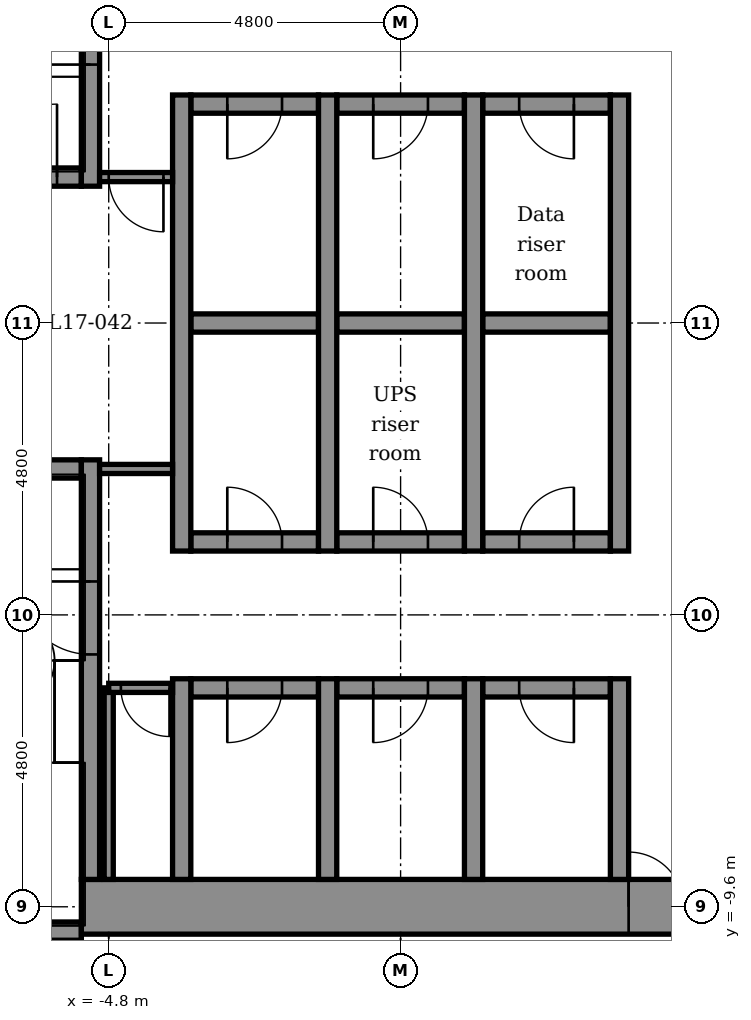
"""IFC4 building model, lengths in metres.
Left out: names, types, materials, properties, quantities, classifications, styles, units other than length and angle.
Written with IfcOpenShell. Run it as: python <this file> out.ifc"""

import sys

from ifc_helpers import new_model, si_unit, direction, frame, frame_2d, origin, place, context, subcontext, project, spatial, rectangle, extrude, element, fill, save


model = new_model("IFC4")
c1 = context("Model", 3, precision=1e-05, world=origin(), true_north=direction((0.0, 1.0)))
c2 = subcontext(c1, "Body", "Model", "MODEL_VIEW")
j1 = project(units=[si_unit("LENGTHUNIT", "METRE"), si_unit("PLANEANGLEUNIT", "RADIAN")], contexts=[c1])
p1 = place(None, origin())
s1 = spatial("IfcSite", under=j1, at=p1, CompositionType="ELEMENT")
p2 = place(p1, origin())
s2 = spatial("IfcBuilding", under=s1, at=p2, CompositionType="ELEMENT")
p3 = place(p2, frame((0.0, 0.0, 91.4)))
s3 = spatial("IfcBuildingStorey", under=s2, at=p3, CompositionType="ELEMENT", Elevation=91.4)
p4 = place(p3, frame((-9.15, -10.0, -0.2), z_axis=(0.0, 0.0, 1.0), x_axis=(1.0, 0.0, 0.0)))
e1 = element("IfcWall", 1, at=p4, inside=s3, PredefinedType="STANDARD", context=c2, shape_type="SweptSolid", body=[
    extrude(rectangle(XDim=3.9, YDim=0.3, at=frame_2d((1.95, 0.0))), origin(), (0.0, 0.0, 1.0), 4.5),
])
p5 = place(p3, frame((-5.25, -9.6, -0.2), z_axis=(0.0, 0.0, 1.0), x_axis=(1.0, 0.0, 0.0)))
e2 = element("IfcWall", 2, at=p5, inside=s3, PredefinedType="SHEAR", context=c2, shape_type="SweptSolid", body=[
    extrude(rectangle(XDim=10.2, YDim=0.9, at=frame_2d((5.1, 0.0))), origin(), (0.0, 0.0, 1.0), 4.5),
])
p6 = place(p5, frame((9.0, 0.0, 0.2)))
e3 = element("IfcOpeningElement", 3, at=p6, cuts=e2, PredefinedType="OPENING", context=c2, shape_type="SweptSolid", body=[
    extrude(rectangle(XDim=0.9, YDim=2.1, at=frame_2d((0.45, 1.05))), frame((0.0, 0.46, 0.0), z_axis=(0.0, -1.0, 0.0), x_axis=(1.0, 0.0, 0.0)), (0.0, 0.0, 1.0), 0.92),
])
p7 = place(p3, frame((-3.45, -6.0, -0.2), z_axis=(0.0, 0.0, 1.0), x_axis=(1.0, 0.0, 0.0)))
e4 = element("IfcWall", 4, at=p7, inside=s3, PredefinedType="STANDARD", context=c2, shape_type="SweptSolid", body=[
    extrude(rectangle(XDim=2.1, YDim=0.3, at=frame_2d((1.05, 0.0))), origin(), (0.0, 0.0, 1.0), 4.5),
])
p8 = place(p7, frame((0.6, 0.0, 0.2)))
e5 = element("IfcOpeningElement", 5, at=p8, cuts=e4, PredefinedType="OPENING", context=c2, shape_type="SweptSolid", body=[
    extrude(rectangle(XDim=0.9, YDim=2.1, at=frame_2d((0.45, 1.05))), frame((0.0, 0.16, 0.0), z_axis=(0.0, -1.0, 0.0), x_axis=(1.0, 0.0, 0.0)), (0.0, 0.0, 1.0), 0.32),
])
p9 = place(p3, frame((-1.05, -6.0, -0.2), z_axis=(0.0, 0.0, 1.0), x_axis=(1.0, 0.0, 0.0)))
e6 = element("IfcWall", 6, at=p9, inside=s3, PredefinedType="STANDARD", context=c2, shape_type="SweptSolid", body=[
    extrude(rectangle(XDim=2.1, YDim=0.3, at=frame_2d((1.05, 0.0))), origin(), (0.0, 0.0, 1.0), 4.5),
])
p10 = place(p9, frame((0.6, 0.0, 0.2)))
e7 = element("IfcOpeningElement", 7, at=p10, cuts=e6, PredefinedType="OPENING", context=c2, shape_type="SweptSolid", body=[
    extrude(rectangle(XDim=0.9, YDim=2.1, at=frame_2d((0.45, 1.05))), frame((0.0, 0.16, 0.0), z_axis=(0.0, -1.0, 0.0), x_axis=(1.0, 0.0, 0.0)), (0.0, 0.0, 1.0), 0.32),
])
p11 = place(p3, frame((1.35, -6.0, -0.2), z_axis=(0.0, 0.0, 1.0), x_axis=(1.0, 0.0, 0.0)))
e8 = element("IfcWall", 8, at=p11, inside=s3, PredefinedType="STANDARD", context=c2, shape_type="SweptSolid", body=[
    extrude(rectangle(XDim=2.1, YDim=0.3, at=frame_2d((1.05, 0.0))), origin(), (0.0, 0.0, 1.0), 4.5),
])
p12 = place(p11, frame((0.6, 0.0, 0.2)))
e9 = element("IfcOpeningElement", 9, at=p12, cuts=e8, PredefinedType="OPENING", context=c2, shape_type="SweptSolid", body=[
    extrude(rectangle(XDim=0.9, YDim=2.1, at=frame_2d((0.45, 1.05))), frame((0.0, 0.16, 0.0), z_axis=(0.0, -1.0, 0.0), x_axis=(1.0, 0.0, 0.0)), (0.0, 0.0, 1.0), 0.32),
])
p13 = place(p3, frame((-3.45, -3.6, -0.2), z_axis=(0.0, 0.0, 1.0), x_axis=(1.0, 0.0, 0.0)))
e10 = element("IfcWall", 10, at=p13, inside=s3, PredefinedType="STANDARD", context=c2, shape_type="SweptSolid", body=[
    extrude(rectangle(XDim=2.1, YDim=0.3, at=frame_2d((1.05, 0.0))), origin(), (0.0, 0.0, 1.0), 4.5),
])
p14 = place(p13, frame((0.6, 0.0, 0.2)))
e11 = element("IfcOpeningElement", 11, at=p14, cuts=e10, PredefinedType="OPENING", context=c2, shape_type="SweptSolid", body=[
    extrude(rectangle(XDim=0.9, YDim=2.1, at=frame_2d((0.45, 1.05))), frame((0.0, 0.16, 0.0), z_axis=(0.0, -1.0, 0.0), x_axis=(1.0, 0.0, 0.0)), (0.0, 0.0, 1.0), 0.32),
])
p15 = place(p3, frame((-1.05, -3.6, -0.2), z_axis=(0.0, 0.0, 1.0), x_axis=(1.0, 0.0, 0.0)))
e12 = element("IfcWall", 12, at=p15, inside=s3, PredefinedType="STANDARD", context=c2, shape_type="SweptSolid", body=[
    extrude(rectangle(XDim=2.1, YDim=0.3, at=frame_2d((1.05, 0.0))), origin(), (0.0, 0.0, 1.0), 4.5),
])
p16 = place(p15, frame((0.6, 0.0, 0.2)))
e13 = element("IfcOpeningElement", 13, at=p16, cuts=e12, PredefinedType="OPENING", context=c2, shape_type="SweptSolid", body=[
    extrude(rectangle(XDim=0.9, YDim=2.1, at=frame_2d((0.45, 1.05))), frame((0.0, 0.16, 0.0), z_axis=(0.0, -1.0, 0.0), x_axis=(1.0, 0.0, 0.0)), (0.0, 0.0, 1.0), 0.32),
])
p17 = place(p3, frame((1.35, -3.6, -0.2), z_axis=(0.0, 0.0, 1.0), x_axis=(1.0, 0.0, 0.0)))
e14 = element("IfcWall", 14, at=p17, inside=s3, PredefinedType="STANDARD", context=c2, shape_type="SweptSolid", body=[
    extrude(rectangle(XDim=2.1, YDim=0.3, at=frame_2d((1.05, 0.0))), origin(), (0.0, 0.0, 1.0), 4.5),
])
p18 = place(p17, frame((0.6, 0.0, 0.2)))
e15 = element("IfcOpeningElement", 15, at=p18, cuts=e14, PredefinedType="OPENING", context=c2, shape_type="SweptSolid", body=[
    extrude(rectangle(XDim=0.9, YDim=2.1, at=frame_2d((0.45, 1.05))), frame((0.0, 0.16, 0.0), z_axis=(0.0, -1.0, 0.0), x_axis=(1.0, 0.0, 0.0)), (0.0, 0.0, 1.0), 0.32),
])
p19 = place(p3, frame((-7.25, -2.4, -0.2), z_axis=(0.0, 0.0, 1.0), x_axis=(1.0, 0.0, 0.0)))
e16 = element("IfcWall", 16, at=p19, inside=s3, PredefinedType="STANDARD", context=c2, shape_type="SweptSolid", body=[
    extrude(rectangle(XDim=2.0, YDim=0.3, at=frame_2d((1.0, 0.0))), origin(), (0.0, 0.0, 1.0), 4.5),
])
p20 = place(p3, frame((-3.45, 0.0, -0.2), z_axis=(0.0, 0.0, 1.0), x_axis=(1.0, 0.0, 0.0)))
e17 = element("IfcWall", 17, at=p20, inside=s3, PredefinedType="STANDARD", context=c2, shape_type="SweptSolid", body=[
    extrude(rectangle(XDim=2.1, YDim=0.3, at=frame_2d((1.05, 0.0))), origin(), (0.0, 0.0, 1.0), 4.5),
])
p21 = place(p3, frame((-1.05, 0.0, -0.2), z_axis=(0.0, 0.0, 1.0), x_axis=(1.0, 0.0, 0.0)))
e18 = element("IfcWall", 18, at=p21, inside=s3, PredefinedType="STANDARD", context=c2, shape_type="SweptSolid", body=[
    extrude(rectangle(XDim=2.1, YDim=0.3, at=frame_2d((1.05, 0.0))), origin(), (0.0, 0.0, 1.0), 4.5),
])
p22 = place(p3, frame((1.35, 0.0, -0.2), z_axis=(0.0, 0.0, 1.0), x_axis=(1.0, 0.0, 0.0)))
e19 = element("IfcWall", 19, at=p22, inside=s3, PredefinedType="STANDARD", context=c2, shape_type="SweptSolid", body=[
    extrude(rectangle(XDim=2.1, YDim=0.3, at=frame_2d((1.05, 0.0))), origin(), (0.0, 0.0, 1.0), 4.5),
])
p23 = place(p3, frame((-7.25, 2.4, -0.2), z_axis=(0.0, 0.0, 1.0), x_axis=(1.0, 0.0, 0.0)))
e20 = element("IfcWall", 20, at=p23, inside=s3, PredefinedType="STANDARD", context=c2, shape_type="SweptSolid", body=[
    extrude(rectangle(XDim=2.0, YDim=0.3, at=frame_2d((1.0, 0.0))), origin(), (0.0, 0.0, 1.0), 4.5),
])
p24 = place(p23, frame((0.4, 0.0, 0.2)))
e21 = element("IfcOpeningElement", 21, at=p24, cuts=e20, PredefinedType="OPENING", context=c2, shape_type="SweptSolid", body=[
    extrude(rectangle(XDim=1.2, YDim=2.1, at=frame_2d((0.6, 1.05))), frame((0.0, 0.16, 0.0), z_axis=(0.0, -1.0, 0.0), x_axis=(1.0, 0.0, 0.0)), (0.0, 0.0, 1.0), 0.32),
])
p25 = place(p3, frame((-3.45, 3.6, -0.2), z_axis=(0.0, 0.0, 1.0), x_axis=(1.0, 0.0, 0.0)))
e22 = element("IfcWall", 22, at=p25, inside=s3, PredefinedType="STANDARD", context=c2, shape_type="SweptSolid", body=[
    extrude(rectangle(XDim=2.1, YDim=0.3, at=frame_2d((1.05, 0.0))), origin(), (0.0, 0.0, 1.0), 4.5),
])
p26 = place(p25, frame((0.6, 0.0, 0.2)))
e23 = element("IfcOpeningElement", 23, at=p26, cuts=e22, PredefinedType="OPENING", context=c2, shape_type="SweptSolid", body=[
    extrude(rectangle(XDim=0.9, YDim=2.1, at=frame_2d((0.45, 1.05))), frame((0.0, 0.16, 0.0), z_axis=(0.0, -1.0, 0.0), x_axis=(1.0, 0.0, 0.0)), (0.0, 0.0, 1.0), 0.32),
])
p27 = place(p3, frame((-1.05, 3.6, -0.2), z_axis=(0.0, 0.0, 1.0), x_axis=(1.0, 0.0, 0.0)))
e24 = element("IfcWall", 24, at=p27, inside=s3, PredefinedType="STANDARD", context=c2, shape_type="SweptSolid", body=[
    extrude(rectangle(XDim=2.1, YDim=0.3, at=frame_2d((1.05, 0.0))), origin(), (0.0, 0.0, 1.0), 4.5),
])
p28 = place(p27, frame((0.6, 0.0, 0.2)))
e25 = element("IfcOpeningElement", 25, at=p28, cuts=e24, PredefinedType="OPENING", context=c2, shape_type="SweptSolid", body=[
    extrude(rectangle(XDim=0.9, YDim=2.1, at=frame_2d((0.45, 1.05))), frame((0.0, 0.16, 0.0), z_axis=(0.0, -1.0, 0.0), x_axis=(1.0, 0.0, 0.0)), (0.0, 0.0, 1.0), 0.32),
])
p29 = place(p3, frame((1.35, 3.6, -0.2), z_axis=(0.0, 0.0, 1.0), x_axis=(1.0, 0.0, 0.0)))
e26 = element("IfcWall", 26, at=p29, inside=s3, PredefinedType="STANDARD", context=c2, shape_type="SweptSolid", body=[
    extrude(rectangle(XDim=2.1, YDim=0.3, at=frame_2d((1.05, 0.0))), origin(), (0.0, 0.0, 1.0), 4.5),
])
p30 = place(p29, frame((0.6, 0.0, 0.2)))
e27 = element("IfcOpeningElement", 27, at=p30, cuts=e26, PredefinedType="OPENING", context=c2, shape_type="SweptSolid", body=[
    extrude(rectangle(XDim=0.9, YDim=2.1, at=frame_2d((0.45, 1.05))), frame((0.0, 0.16, 0.0), z_axis=(0.0, -1.0, 0.0), x_axis=(1.0, 0.0, 0.0)), (0.0, 0.0, 1.0), 0.32),
])
p31 = place(p3, frame((-5.1, -9.15, -0.2), z_axis=(0.0, 0.0, 1.0), x_axis=(0.0, 1.0, 0.0)))
e28 = element("IfcWall", 28, at=p31, inside=s3, PredefinedType="STANDARD", context=c2, shape_type="SweptSolid", body=[
    extrude(rectangle(XDim=6.9, YDim=0.3, at=frame_2d((3.45, 0.0))), origin(), (0.0, 0.0, 1.0), 4.5),
])
p32 = place(p31, frame((3.7, 0.0, 0.2)))
e29 = element("IfcOpeningElement", 29, at=p32, cuts=e28, PredefinedType="OPENING", context=c2, shape_type="SweptSolid", body=[
    extrude(rectangle(XDim=1.2, YDim=2.1, at=frame_2d((0.6, 1.05))), frame((0.0, 0.16, 0.0), z_axis=(0.0, -1.0, 0.0), x_axis=(1.0, 0.0, 0.0)), (0.0, 0.0, 1.0), 0.32),
])
p33 = place(p3, frame((-5.1, 2.25, -0.2), z_axis=(0.0, 0.0, 1.0), x_axis=(0.0, 1.0, 0.0)))
e30 = element("IfcWall", 30, at=p33, inside=s3, PredefinedType="STANDARD", context=c2, shape_type="SweptSolid", body=[
    extrude(rectangle(XDim=6.9, YDim=0.3, at=frame_2d((3.45, 0.0))), origin(), (0.0, 0.0, 1.0), 4.5),
])
p34 = place(p33, frame((2.0, 0.0, 0.2)))
e31 = element("IfcOpeningElement", 31, at=p34, cuts=e30, PredefinedType="OPENING", context=c2, shape_type="SweptSolid", body=[
    extrude(rectangle(XDim=1.2, YDim=2.1, at=frame_2d((0.6, 1.05))), frame((0.0, 0.16, 0.0), z_axis=(0.0, -1.0, 0.0), x_axis=(1.0, 0.0, 0.0)), (0.0, 0.0, 1.0), 0.32),
])
p35 = place(p3, frame((-3.6, -9.15, -0.2), z_axis=(0.0, 0.0, 1.0), x_axis=(0.0, 1.0, 0.0)))
e32 = element("IfcWall", 32, at=p35, inside=s3, PredefinedType="STANDARD", context=c2, shape_type="SweptSolid", body=[
    extrude(rectangle(XDim=3.3, YDim=0.3, at=frame_2d((1.65, 0.0))), origin(), (0.0, 0.0, 1.0), 4.5),
])
p36 = place(p3, frame((-3.6, -3.75, -0.2), z_axis=(0.0, 0.0, 1.0), x_axis=(0.0, 1.0, 0.0)))
e33 = element("IfcWall", 33, at=p36, inside=s3, PredefinedType="STANDARD", context=c2, shape_type="SweptSolid", body=[
    extrude(rectangle(XDim=7.5, YDim=0.3, at=frame_2d((3.75, 0.0))), origin(), (0.0, 0.0, 1.0), 4.5),
])
p37 = place(p3, frame((-1.2, -9.15, -0.2), z_axis=(0.0, 0.0, 1.0), x_axis=(0.0, 1.0, 0.0)))
e34 = element("IfcWall", 34, at=p37, inside=s3, PredefinedType="STANDARD", context=c2, shape_type="SweptSolid", body=[
    extrude(rectangle(XDim=3.3, YDim=0.3, at=frame_2d((1.65, 0.0))), origin(), (0.0, 0.0, 1.0), 4.5),
])
p38 = place(p3, frame((-1.2, -3.75, -0.2), z_axis=(0.0, 0.0, 1.0), x_axis=(0.0, 1.0, 0.0)))
e35 = element("IfcWall", 35, at=p38, inside=s3, PredefinedType="STANDARD", context=c2, shape_type="SweptSolid", body=[
    extrude(rectangle(XDim=7.5, YDim=0.3, at=frame_2d((3.75, 0.0))), origin(), (0.0, 0.0, 1.0), 4.5),
])
p39 = place(p3, frame((1.2, -9.15, -0.2), z_axis=(0.0, 0.0, 1.0), x_axis=(0.0, 1.0, 0.0)))
e36 = element("IfcWall", 36, at=p39, inside=s3, PredefinedType="STANDARD", context=c2, shape_type="SweptSolid", body=[
    extrude(rectangle(XDim=3.3, YDim=0.3, at=frame_2d((1.65, 0.0))), origin(), (0.0, 0.0, 1.0), 4.5),
])
p40 = place(p3, frame((1.2, -3.75, -0.2), z_axis=(0.0, 0.0, 1.0), x_axis=(0.0, 1.0, 0.0)))
e37 = element("IfcWall", 37, at=p40, inside=s3, PredefinedType="STANDARD", context=c2, shape_type="SweptSolid", body=[
    extrude(rectangle(XDim=7.5, YDim=0.3, at=frame_2d((3.75, 0.0))), origin(), (0.0, 0.0, 1.0), 4.5),
])
p41 = place(p3, frame((3.6, -9.15, -0.2), z_axis=(0.0, 0.0, 1.0), x_axis=(0.0, 1.0, 0.0)))
e38 = element("IfcWall", 38, at=p41, inside=s3, PredefinedType="STANDARD", context=c2, shape_type="SweptSolid", body=[
    extrude(rectangle(XDim=3.3, YDim=0.3, at=frame_2d((1.65, 0.0))), origin(), (0.0, 0.0, 1.0), 4.5),
])
p42 = place(p3, frame((3.6, -3.75, -0.2), z_axis=(0.0, 0.0, 1.0), x_axis=(0.0, 1.0, 0.0)))
e39 = element("IfcWall", 39, at=p42, inside=s3, PredefinedType="STANDARD", context=c2, shape_type="SweptSolid", body=[
    extrude(rectangle(XDim=7.5, YDim=0.3, at=frame_2d((3.75, 0.0))), origin(), (0.0, 0.0, 1.0), 4.5),
])
p43 = place(p3, frame((-4.8, -9.15, 0.0), z_axis=(0.0, 0.0, 1.0), x_axis=(0.0, 1.0, 0.0)))
e40 = element("IfcWall", 40, at=p43, inside=s3, PredefinedType="PARTITIONING", context=c2, shape_type="SweptSolid", body=[
    extrude(rectangle(XDim=3.15, YDim=0.15, at=frame_2d((1.575, 0.0))), origin(), (0.0, 0.0, 1.0), 4.3),
])
p44 = place(p3, frame((-4.8, -6.0, 0.0), z_axis=(0.0, 0.0, 1.0), x_axis=(1.0, 0.0, 0.0)))
e41 = element("IfcWall", 41, at=p44, inside=s3, PredefinedType="PARTITIONING", context=c2, shape_type="SweptSolid", body=[
    extrude(rectangle(XDim=1.05, YDim=0.15, at=frame_2d((0.525, 0.0))), origin(), (0.0, 0.0, 1.0), 4.3),
])
p45 = place(p44, frame((0.2, 0.0, 0.0)))
e42 = element("IfcOpeningElement", 42, at=p45, cuts=e41, PredefinedType="OPENING", context=c2, shape_type="SweptSolid", body=[
    extrude(rectangle(XDim=0.8, YDim=2.1, at=frame_2d((0.4, 1.05))), frame((0.0, 0.085, 0.0), z_axis=(0.0, -1.0, 0.0), x_axis=(1.0, 0.0, 0.0)), (0.0, 0.0, 1.0), 0.17),
])
p46 = place(p3, frame((-4.95, 2.4, 0.0), z_axis=(0.0, 0.0, 1.0), x_axis=(1.0, 0.0, 0.0)))
e43 = element("IfcWall", 43, at=p46, inside=s3, PredefinedType="PARTITIONING", context=c2, shape_type="SweptSolid", body=[
    extrude(rectangle(XDim=1.2, YDim=0.15, at=frame_2d((0.6, 0.0))), origin(), (0.0, 0.0, 1.0), 4.3),
])
p47 = place(p46, frame((0.15, 0.0, 0.0)))
e44 = element("IfcOpeningElement", 44, at=p47, cuts=e43, PredefinedType="OPENING", context=c2, shape_type="SweptSolid", body=[
    extrude(rectangle(XDim=0.9, YDim=2.1, at=frame_2d((0.45, 1.05))), frame((0.0, 0.085, 0.0), z_axis=(0.0, -1.0, 0.0), x_axis=(1.0, 0.0, 0.0)), (0.0, 0.0, 1.0), 0.17),
])
p48 = place(p3, frame((-4.95, -2.4, 0.0), z_axis=(0.0, 0.0, 1.0), x_axis=(1.0, 0.0, 0.0)))
e45 = element("IfcWall", 45, at=p48, inside=s3, PredefinedType="PARTITIONING", context=c2, shape_type="SweptSolid", body=[
    extrude(rectangle(XDim=1.2, YDim=0.15, at=frame_2d((0.6, 0.0))), origin(), (0.0, 0.0, 1.0), 4.3),
])
p49 = place(p45, frame((0.8, 0.0, 0.0), z_axis=(0.0, 0.0, 1.0), x_axis=(-1.0, 0.0, 0.0)))
e46 = element("IfcDoor", 46, at=p49, inside=s3, OperationType="SINGLE_SWING_RIGHT", PredefinedType="DOOR", context=c2, shape_type="SweptSolid", body=[
    extrude(rectangle(XDim=0.8, YDim=2.1, at=frame_2d((0.4, 1.05))), frame((0.0, 0.025, 0.0), z_axis=(0.0, -1.0, 0.0), x_axis=(1.0, 0.0, 0.0)), (0.0, 0.0, 1.0), 0.05),
])
fill(e42, e46)
p50 = place(p34, origin())
e47 = element("IfcDoor", 47, at=p50, inside=s3, OperationType="SINGLE_SWING_LEFT", PredefinedType="DOOR", context=c2, shape_type="SweptSolid", body=[
    extrude(rectangle(XDim=1.2, YDim=2.1, at=frame_2d((0.6, 1.05))), frame((0.0, 0.025, 0.0), z_axis=(0.0, -1.0, 0.0), x_axis=(1.0, 0.0, 0.0)), (0.0, 0.0, 1.0), 0.05),
])
fill(e31, e47)
p51 = place(p32, origin())
e48 = element("IfcDoor", 48, at=p51, inside=s3, OperationType="SINGLE_SWING_RIGHT", PredefinedType="DOOR", context=c2, shape_type="SweptSolid", body=[
    extrude(rectangle(XDim=1.2, YDim=2.1, at=frame_2d((0.6, 1.05))), frame((0.0, 0.025, 0.0), z_axis=(0.0, -1.0, 0.0), x_axis=(1.0, 0.0, 0.0)), (0.0, 0.0, 1.0), 0.05),
])
fill(e29, e48)
p52 = place(p26, frame((0.9, 0.0, 0.0), z_axis=(0.0, 0.0, 1.0), x_axis=(-1.0, 0.0, 0.0)))
e49 = element("IfcDoor", 49, at=p52, inside=s3, OperationType="SINGLE_SWING_LEFT", PredefinedType="DOOR", context=c2, shape_type="SweptSolid", body=[
    extrude(rectangle(XDim=0.9, YDim=2.1, at=frame_2d((0.45, 1.05))), frame((0.0, 0.025, 0.0), z_axis=(0.0, -1.0, 0.0), x_axis=(1.0, 0.0, 0.0)), (0.0, 0.0, 1.0), 0.05),
])
fill(e23, e49)
p53 = place(p28, frame((0.9, 0.0, 0.0), z_axis=(0.0, 0.0, 1.0), x_axis=(-1.0, 0.0, 0.0)))
e50 = element("IfcDoor", 50, at=p53, inside=s3, OperationType="SINGLE_SWING_LEFT", PredefinedType="DOOR", context=c2, shape_type="SweptSolid", body=[
    extrude(rectangle(XDim=0.9, YDim=2.1, at=frame_2d((0.45, 1.05))), frame((0.0, 0.025, 0.0), z_axis=(0.0, -1.0, 0.0), x_axis=(1.0, 0.0, 0.0)), (0.0, 0.0, 1.0), 0.05),
])
fill(e25, e50)
p54 = place(p30, frame((0.9, 0.0, 0.0), z_axis=(0.0, 0.0, 1.0), x_axis=(-1.0, 0.0, 0.0)))
e51 = element("IfcDoor", 51, at=p54, inside=s3, OperationType="SINGLE_SWING_RIGHT", PredefinedType="DOOR", context=c2, shape_type="SweptSolid", body=[
    extrude(rectangle(XDim=0.9, YDim=2.1, at=frame_2d((0.45, 1.05))), frame((0.0, 0.025, 0.0), z_axis=(0.0, -1.0, 0.0), x_axis=(1.0, 0.0, 0.0)), (0.0, 0.0, 1.0), 0.05),
])
fill(e27, e51)
p55 = place(p14, origin())
e52 = element("IfcDoor", 52, at=p55, inside=s3, OperationType="SINGLE_SWING_LEFT", PredefinedType="DOOR", context=c2, shape_type="SweptSolid", body=[
    extrude(rectangle(XDim=0.9, YDim=2.1, at=frame_2d((0.45, 1.05))), frame((0.0, 0.025, 0.0), z_axis=(0.0, -1.0, 0.0), x_axis=(1.0, 0.0, 0.0)), (0.0, 0.0, 1.0), 0.05),
])
fill(e11, e52)
p56 = place(p16, origin())
e53 = element("IfcDoor", 53, at=p56, inside=s3, OperationType="SINGLE_SWING_LEFT", PredefinedType="DOOR", context=c2, shape_type="SweptSolid", body=[
    extrude(rectangle(XDim=0.9, YDim=2.1, at=frame_2d((0.45, 1.05))), frame((0.0, 0.025, 0.0), z_axis=(0.0, -1.0, 0.0), x_axis=(1.0, 0.0, 0.0)), (0.0, 0.0, 1.0), 0.05),
])
fill(e13, e53)
p57 = place(p18, origin())
e54 = element("IfcDoor", 54, at=p57, inside=s3, OperationType="SINGLE_SWING_RIGHT", PredefinedType="DOOR", context=c2, shape_type="SweptSolid", body=[
    extrude(rectangle(XDim=0.9, YDim=2.1, at=frame_2d((0.45, 1.05))), frame((0.0, 0.025, 0.0), z_axis=(0.0, -1.0, 0.0), x_axis=(1.0, 0.0, 0.0)), (0.0, 0.0, 1.0), 0.05),
])
fill(e15, e54)
p58 = place(p8, frame((0.9, 0.0, 0.0), z_axis=(0.0, 0.0, 1.0), x_axis=(-1.0, 0.0, 0.0)))
e55 = element("IfcDoor", 55, at=p58, inside=s3, OperationType="SINGLE_SWING_LEFT", PredefinedType="DOOR", context=c2, shape_type="SweptSolid", body=[
    extrude(rectangle(XDim=0.9, YDim=2.1, at=frame_2d((0.45, 1.05))), frame((0.0, 0.025, 0.0), z_axis=(0.0, -1.0, 0.0), x_axis=(1.0, 0.0, 0.0)), (0.0, 0.0, 1.0), 0.05),
])
fill(e5, e55)
p59 = place(p10, frame((0.9, 0.0, 0.0), z_axis=(0.0, 0.0, 1.0), x_axis=(-1.0, 0.0, 0.0)))
e56 = element("IfcDoor", 56, at=p59, inside=s3, OperationType="SINGLE_SWING_LEFT", PredefinedType="DOOR", context=c2, shape_type="SweptSolid", body=[
    extrude(rectangle(XDim=0.9, YDim=2.1, at=frame_2d((0.45, 1.05))), frame((0.0, 0.025, 0.0), z_axis=(0.0, -1.0, 0.0), x_axis=(1.0, 0.0, 0.0)), (0.0, 0.0, 1.0), 0.05),
])
fill(e7, e56)
p60 = place(p12, frame((0.9, 0.0, 0.0), z_axis=(0.0, 0.0, 1.0), x_axis=(-1.0, 0.0, 0.0)))
e57 = element("IfcDoor", 57, at=p60, inside=s3, OperationType="SINGLE_SWING_RIGHT", PredefinedType="DOOR", context=c2, shape_type="SweptSolid", body=[
    extrude(rectangle(XDim=0.9, YDim=2.1, at=frame_2d((0.45, 1.05))), frame((0.0, 0.025, 0.0), z_axis=(0.0, -1.0, 0.0), x_axis=(1.0, 0.0, 0.0)), (0.0, 0.0, 1.0), 0.05),
])
fill(e9, e57)
p61 = place(p6, origin())
e58 = element("IfcDoor", 58, at=p61, inside=s3, OperationType="SINGLE_SWING_LEFT", PredefinedType="DOOR", context=c2, shape_type="SweptSolid", body=[
    extrude(rectangle(XDim=0.9, YDim=2.1, at=frame_2d((0.45, 1.05))), frame((0.0, 0.025, 0.0), z_axis=(0.0, -1.0, 0.0), x_axis=(1.0, 0.0, 0.0)), (0.0, 0.0, 1.0), 0.05),
])
fill(e3, e58)
p62 = place(p47, frame((0.9, 0.0, 0.0), z_axis=(0.0, 0.0, 1.0), x_axis=(-1.0, 0.0, 0.0)))
e59 = element("IfcDoor", 59, at=p62, inside=s3, OperationType="SINGLE_SWING_RIGHT", PredefinedType="DOOR", context=c2, shape_type="SweptSolid", body=[
    extrude(rectangle(XDim=0.9, YDim=2.1, at=frame_2d((0.45, 1.05))), frame((0.0, 0.025, 0.0), z_axis=(0.0, -1.0, 0.0), x_axis=(1.0, 0.0, 0.0)), (0.0, 0.0, 1.0), 0.05),
])
fill(e44, e59)
p63 = place(p24, origin())
e60 = element("IfcDoor", 60, at=p63, inside=s3, OperationType="SINGLE_SWING_RIGHT", PredefinedType="DOOR", context=c2, shape_type="SweptSolid", body=[
    extrude(rectangle(XDim=1.2, YDim=2.1, at=frame_2d((0.6, 1.05))), frame((0.0, 0.025, 0.0), z_axis=(0.0, -1.0, 0.0), x_axis=(1.0, 0.0, 0.0)), (0.0, 0.0, 1.0), 0.05),
])
fill(e21, e60)
save(model, sys.argv[1])
